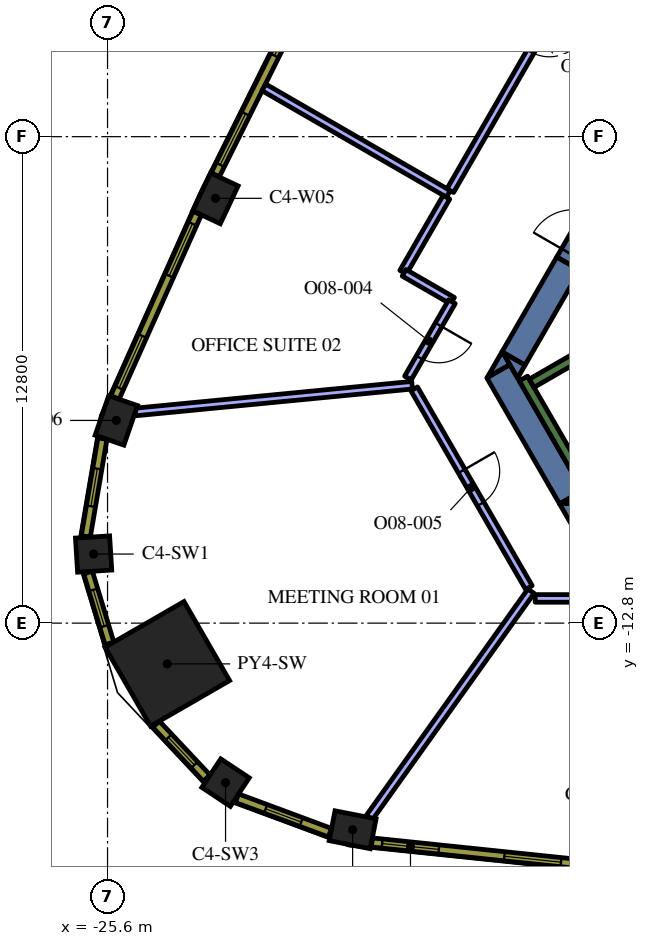
"""IFC4 building model, lengths in metres.
Left out: names, types, materials, properties, quantities, classifications, styles, units other than length and angle.
Written with IfcOpenShell. Run it as: python <this file> out.ifc"""

import sys

from ifc_helpers import new_model, si_unit, direction, frame, frame_2d, origin, origin_2d, place, context, subcontext, project, spatial, polyline, rectangle, outline, extrude, element, fill, save


model = new_model("IFC4")
c1 = context("Model", 3, precision=1e-05, world=origin(), true_north=direction((0.0, 1.0)))
c2 = subcontext(c1, "Body", "Model", "MODEL_VIEW")
j1 = project(units=[si_unit("LENGTHUNIT", "METRE"), si_unit("PLANEANGLEUNIT", "RADIAN")], contexts=[c1])
p1 = place(None, origin())
s1 = spatial("IfcSite", under=j1, at=p1, CompositionType="ELEMENT")
p2 = place(p1, origin())
s2 = spatial("IfcBuilding", under=s1, at=p2, CompositionType="ELEMENT")
p3 = place(p2, frame((0.0, 0.0, 231.0)))
s3 = spatial("IfcBuildingStorey", under=s2, at=p3, CompositionType="ELEMENT", Elevation=231.0)
p4 = place(p3, frame((-24.027, -13.872, 0.0), z_axis=(0.0, 0.0, 1.0), x_axis=(-0.866025403784, -0.5, 0.0)))
e1 = element("IfcColumn", 1, at=p4, inside=s3, PredefinedType="COLUMN", context=c2, shape_type="SweptSolid", body=[
    extrude(rectangle(XDim=2.4, YDim=2.4, at=origin_2d()), origin(), (0.0, 0.0, 1.0), 4.2),
])
for number, where, z_axis, x_axis in (
    (2, (-19.15, -18.237, 0.0), (0.0, 0.0, 1.0), (0.981, -0.192, 0.0)),
    (3, (-22.76, -1.623, 0.0), (0.0, 0.0, 1.0), (-0.426, -0.905, 0.0)),
    (4, (-25.369, -7.466, 0.0), (0.0, 0.0, 1.0), (-0.324, -0.946, 0.0)),
):
    element("IfcColumn", number, at=place(p3, frame(where, z_axis=z_axis, x_axis=x_axis)), inside=s3, PredefinedType="COLUMN", context=c2, shape_type="SweptSolid", body=[
        extrude(rectangle(XDim=1.1, YDim=0.8, at=origin_2d()), origin(), (0.0, 0.0, 1.0), 4.2),
    ])
for number, where, z_axis, x_axis in (
    (5, (-25.967, -10.982, 0.0), (0.0, 0.0, 1.0), (0.062, -0.998, 0.0)),
    (6, (-22.494, -16.997, 0.0), (0.0, 0.0, 1.0), (0.833, -0.553, 0.0)),
):
    element("IfcColumn", number, at=place(p3, frame(where, z_axis=z_axis, x_axis=x_axis)), inside=s3, PredefinedType="COLUMN", context=c2, shape_type="SweptSolid", body=[
        extrude(rectangle(XDim=0.9, YDim=0.9, at=origin_2d()), origin(), (0.0, 0.0, 1.0), 4.2),
    ])
p5 = place(p3, origin())
e7 = element("IfcWall", 7, at=p5, inside=s3, PredefinedType="SOLIDWALL", context=c2, shape_type="SweptSolid", body=[
    extrude(outline(polyline([(-13.712, -9.65), (-13.324, -9.65), (-13.324, -10.322), (-13.712, -9.65)])), origin(), (0.0, 0.0, 1.0), 4.2),
])
p6 = place(p3, frame((-13.402, -9.487, 0.0), z_axis=(0.0, 0.0, 1.0), x_axis=(-0.500020498207, 0.866013568815, 0.0)))
e8 = element("IfcWall", 8, at=p6, inside=s3, PredefinedType="SOLIDWALL", context=c2, shape_type="SweptSolid", body=[
    extrude(rectangle(XDim=3.829, YDim=0.7, at=frame_2d((1.915, 0.0))), origin(), (0.0, 0.0, 1.0), 4.2),
])
e9 = element("IfcWall", 9, at=p5, inside=s3, PredefinedType="SOLIDWALL", context=c2, shape_type="SweptSolid", body=[
    extrude(outline(polyline([(-15.014, -5.995), (-15.611, -6.339), (-15.213, -5.65), (-15.014, -5.995)])), origin(), (0.0, 0.0, 1.0), 4.2),
])
e10 = element("IfcWall", 10, at=p5, inside=s3, PredefinedType="SOLIDWALL", context=c2, shape_type="SweptSolid", body=[
    extrude(outline(polyline([(-12.904, -9.65), (-13.68, -9.65), (-13.098, -9.314), (-12.904, -9.65)])), origin(), (0.0, 0.0, 1.0), 4.2),
])
p7 = place(p3, frame((-13.475, -3.339, 0.0), z_axis=(0.0, 0.0, 1.0), x_axis=(-0.499944726303, -0.866057313716, 0.0)))
e11 = element("IfcWall", 11, at=p7, inside=s3, PredefinedType="SOLIDWALL", context=c2, shape_type="SweptSolid", body=[
    extrude(rectangle(XDim=2.884, YDim=0.7, at=frame_2d((1.442, 0.0))), origin(), (0.0, 0.0, 1.0), 4.2),
])
e12 = element("IfcWall", 12, at=p5, inside=s3, PredefinedType="SOLIDWALL", context=c2, shape_type="SweptSolid", body=[
    extrude(outline(polyline([(-14.809, -6.35), (-15.197, -5.678), (-14.615, -6.014), (-14.809, -6.35)])), origin(), (0.0, 0.0, 1.0), 4.2),
])
p8 = place(p3, frame((-12.84, -9.511, 0.0), z_axis=(0.0, 0.0, 1.0), x_axis=(-0.499997733992, 0.866026712061, 0.0)))
e13 = element("IfcWall", 13, at=p8, inside=s3, PredefinedType="SOLIDWALL", context=c2, shape_type="SweptSolid", body=[
    extrude(rectangle(XDim=3.634, YDim=0.25, at=frame_2d((1.817, 0.0))), origin(), (0.0, 0.0, 1.0), 4.2),
])
p9 = place(p3, frame((-14.44, -6.49, 0.0), z_axis=(0.0, 0.0, 1.0), x_axis=(0.866022966069, 0.500004222222, 0.0)))
e14 = element("IfcWall", 14, at=p9, inside=s3, PredefinedType="SOLIDWALL", context=c2, shape_type="SweptSolid", body=[
    extrude(rectangle(XDim=6.8, YDim=0.25, at=frame_2d((3.4, 0.0))), origin(), (0.0, 0.0, 1.0), 4.2),
])
p10 = place(p3, frame((-13.475, -3.339, 0.0), z_axis=(0.0, 0.0, 1.0), x_axis=(0.499954529098, 0.86605165483, 0.0)))
e15 = element("IfcWall", 15, at=p10, inside=s3, PredefinedType="SOLIDWALL", context=c2, shape_type="SweptSolid", body=[
    extrude(rectangle(XDim=1.7, YDim=0.7, at=frame_2d((0.85, 0.0))), origin(), (0.0, 0.0, 1.0), 4.2),
])
p11 = place(p10, frame((0.25, 0.0, 0.0)))
e16 = element("IfcOpeningElement", 16, at=p11, cuts=e15, PredefinedType="OPENING", context=c2, shape_type="SweptSolid", body=[
    extrude(rectangle(XDim=1.2, YDim=2.1, at=frame_2d((0.6, 1.05))), frame((0.0, 0.36, 0.0), z_axis=(0.0, -1.0, 0.0), x_axis=(1.0, 0.0, 0.0)), (0.0, 0.0, 1.0), 0.72),
])
p12 = place(p3, frame((-16.631, -1.506, 0.0), z_axis=(0.0, 0.0, 1.0), x_axis=(-0.866045655253, 0.499964921787, 0.0)))
e17 = element("IfcWall", 17, at=p12, inside=s3, PredefinedType="PARTITIONING", context=c2, shape_type="SweptSolid", body=[
    extrude(rectangle(XDim=5.607, YDim=0.2, at=frame_2d((2.804, 0.0))), origin(), (0.0, 0.0, 1.0), 3.45),
])
p13 = place(p3, frame((-11.871, 6.738, 0.0), z_axis=(0.0, 0.0, 1.0), x_axis=(-0.500019350398, -0.866014231539, 0.0)))
e18 = element("IfcWall", 18, at=p13, inside=s3, PredefinedType="PARTITIONING", context=c2, shape_type="SweptSolid", body=[
    extrude(rectangle(XDim=9.42, YDim=0.2, at=frame_2d((4.71, 0.0))), origin(), (0.0, 0.0, 1.0), 3.45),
])
p14 = place(p13, frame((4.2, 0.0, 0.0)))
e19 = element("IfcOpeningElement", 19, at=p14, cuts=e18, PredefinedType="OPENING", context=c2, shape_type="SweptSolid", body=[
    extrude(rectangle(XDim=1.0, YDim=2.1, at=frame_2d((0.5, 1.05))), frame((0.0, 0.11, 0.0), z_axis=(0.0, -1.0, 0.0), x_axis=(1.0, 0.0, 0.0)), (0.0, 0.0, 1.0), 0.22),
])
p15 = place(p3, frame((-17.586, -6.54, 0.0), z_axis=(0.0, 0.0, 1.0), x_axis=(-0.995357542522, -0.096246363795, 0.0)))
e20 = element("IfcWall", 20, at=p15, inside=s3, PredefinedType="PARTITIONING", context=c2, shape_type="SweptSolid", body=[
    extrude(rectangle(XDim=7.318, YDim=0.2, at=frame_2d((3.659, 0.0))), origin(), (0.0, 0.0, 1.0), 3.45),
])
p16 = place(p3, frame((-16.681, -1.593, 0.0), z_axis=(0.0, 0.0, 1.0), x_axis=(-0.499985038317, -0.866034041744, 0.0)))
e21 = element("IfcWall", 21, at=p16, inside=s3, PredefinedType="PARTITIONING", context=c2, shape_type="SweptSolid", body=[
    extrude(rectangle(XDim=2.28, YDim=0.2, at=frame_2d((1.14, 0.0))), origin(), (0.0, 0.0, 1.0), 3.45),
])
p17 = place(p3, frame((-17.795, -3.582, 0.0), z_axis=(0.0, 0.0, 1.0), x_axis=(0.866016893711, -0.50001473959, 0.0)))
e22 = element("IfcWall", 22, at=p17, inside=s3, PredefinedType="PARTITIONING", context=c2, shape_type="SweptSolid", body=[
    extrude(rectangle(XDim=1.47, YDim=0.2, at=frame_2d((0.735, 0.0))), origin(), (0.0, 0.0, 1.0), 3.45),
])
p18 = place(p3, frame((-16.537, -4.343, 0.0), z_axis=(0.0, 0.0, 1.0), x_axis=(-0.500014285048, -0.866017156151, 0.0)))
e23 = element("IfcWall", 23, at=p18, inside=s3, PredefinedType="PARTITIONING", context=c2, shape_type="SweptSolid", body=[
    extrude(rectangle(XDim=2.317, YDim=0.2, at=frame_2d((1.159, 0.0))), origin(), (0.0, 0.0, 1.0), 3.45),
])
p19 = place(p18, frame((0.7, 0.0, 0.0)))
e24 = element("IfcOpeningElement", 24, at=p19, cuts=e23, PredefinedType="OPENING", context=c2, shape_type="SweptSolid", body=[
    extrude(rectangle(XDim=1.0, YDim=2.1, at=frame_2d((0.5, 1.05))), frame((0.0, 0.11, 0.0), z_axis=(0.0, -1.0, 0.0), x_axis=(1.0, 0.0, 0.0)), (0.0, 0.0, 1.0), 0.22),
])
p20 = place(p3, frame((-14.457, -11.96, 0.0), z_axis=(0.0, 0.0, 1.0), x_axis=(-0.581023578026, -0.813886725397, 0.0)))
e25 = element("IfcWall", 25, at=p20, inside=s3, PredefinedType="PARTITIONING", context=c2, shape_type="SweptSolid", body=[
    extrude(rectangle(XDim=7.318, YDim=0.2, at=frame_2d((3.659, 0.0))), origin(), (0.0, 0.0, 1.0), 3.45),
])
p21 = place(p3, frame((-17.531, -6.635, 0.0), z_axis=(0.0, 0.0, 1.0), x_axis=(0.500009459589, -0.866019942219, 0.0)))
e26 = element("IfcWall", 26, at=p21, inside=s3, PredefinedType="PARTITIONING", context=c2, shape_type="SweptSolid", body=[
    extrude(rectangle(XDim=6.038, YDim=0.2, at=frame_2d((3.019, 0.0))), origin(), (0.0, 0.0, 1.0), 3.45),
])
p22 = place(p21, frame((2.5, 0.0, 0.0)))
e27 = element("IfcOpeningElement", 27, at=p22, cuts=e26, PredefinedType="OPENING", context=c2, shape_type="SweptSolid", body=[
    extrude(rectangle(XDim=1.0, YDim=2.1, at=frame_2d((0.5, 1.05))), frame((0.0, 0.11, 0.0), z_axis=(0.0, -1.0, 0.0), x_axis=(1.0, 0.0, 0.0)), (0.0, 0.0, 1.0), 0.22),
])
p23 = place(p3, frame((-14.347, -12.15, 0.0), z_axis=(0.0, 0.0, 1.0), x_axis=(1.0, 0.0, 0.0)))
e28 = element("IfcWall", 28, at=p23, inside=s3, PredefinedType="PARTITIONING", context=c2, shape_type="SweptSolid", body=[
    extrude(rectangle(XDim=9.817, YDim=0.2, at=frame_2d((4.909, 0.0))), origin(), (0.0, 0.0, 1.0), 3.45),
])
p24 = place(p23, frame((4.4, 0.0, 0.0)))
e29 = element("IfcOpeningElement", 29, at=p24, cuts=e28, PredefinedType="OPENING", context=c2, shape_type="SweptSolid", body=[
    extrude(rectangle(XDim=1.0, YDim=2.1, at=frame_2d((0.5, 1.05))), frame((0.0, 0.11, 0.0), z_axis=(0.0, -1.0, 0.0), x_axis=(1.0, 0.0, 0.0)), (0.0, 0.0, 1.0), 0.22),
])
p25 = place(p3, frame((-18.644, -18.571, 0.0), z_axis=(0.0, 0.0, 1.0), x_axis=(0.994621961215, -0.103571976272, 0.0)))
e30 = element("IfcWall", 30, at=p25, inside=s3, PredefinedType="SOLIDWALL", context=c2, shape_type="SweptSolid", body=[
    extrude(rectangle(XDim=5.311, YDim=0.24, at=frame_2d((2.655, 0.0))), origin(), (0.0, 0.0, 1.0), 3.95),
])
p26 = place(p25, frame((0.271, 0.0, 0.9)))
e31 = element("IfcOpeningElement", 31, at=p26, cuts=e30, PredefinedType="OPENING", context=c2, shape_type="SweptSolid", body=[
    extrude(rectangle(XDim=1.5, YDim=2.55, at=frame_2d((0.75, 1.275))), frame((0.0, 0.13, 0.0), z_axis=(0.0, -1.0, 0.0), x_axis=(1.0, 0.0, 0.0)), (0.0, 0.0, 1.0), 0.26),
])
p27 = place(p25, frame((3.504, 0.0, 0.9)))
e32 = element("IfcOpeningElement", 32, at=p27, cuts=e30, PredefinedType="OPENING", context=c2, shape_type="SweptSolid", body=[
    extrude(rectangle(XDim=1.5, YDim=2.55, at=frame_2d((0.75, 1.275))), frame((0.0, 0.13, 0.0), z_axis=(0.0, -1.0, 0.0), x_axis=(1.0, 0.0, 0.0)), (0.0, 0.0, 1.0), 0.26),
])
p28 = place(p3, frame((-20.407, 3.74, 0.0), z_axis=(0.0, 0.0, 1.0), x_axis=(-0.445129582031, -0.895466166419, 0.0)))
e33 = element("IfcWall", 33, at=p28, inside=s3, PredefinedType="SOLIDWALL", context=c2, shape_type="SweptSolid", body=[
    extrude(rectangle(XDim=5.298, YDim=0.24, at=frame_2d((2.649, 0.0))), origin(), (0.0, 0.0, 1.0), 3.95),
])
p29 = place(p28, frame((0.295, 0.0, 0.9)))
e34 = element("IfcOpeningElement", 34, at=p29, cuts=e33, PredefinedType="OPENING", context=c2, shape_type="SweptSolid", body=[
    extrude(rectangle(XDim=1.5, YDim=2.55, at=frame_2d((0.75, 1.275))), frame((0.0, 0.13, 0.0), z_axis=(0.0, -1.0, 0.0), x_axis=(1.0, 0.0, 0.0)), (0.0, 0.0, 1.0), 0.26),
])
p30 = place(p28, frame((3.504, 0.0, 0.9)))
e35 = element("IfcOpeningElement", 35, at=p30, cuts=e33, PredefinedType="OPENING", context=c2, shape_type="SweptSolid", body=[
    extrude(rectangle(XDim=1.5, YDim=2.55, at=frame_2d((0.75, 1.275))), frame((0.0, 0.13, 0.0), z_axis=(0.0, -1.0, 0.0), x_axis=(1.0, 0.0, 0.0)), (0.0, 0.0, 1.0), 0.26),
])
p31 = place(p3, frame((-23.24, -2.011, 0.0), z_axis=(0.0, 0.0, 1.0), x_axis=(-0.407579651789, -0.913169659728, 0.0)))
e36 = element("IfcWall", 36, at=p31, inside=s3, PredefinedType="SOLIDWALL", context=c2, shape_type="SweptSolid", body=[
    extrude(rectangle(XDim=5.311, YDim=0.24, at=frame_2d((2.655, 0.0))), origin(), (0.0, 0.0, 1.0), 3.95),
])
p32 = place(p31, frame((0.306, 0.0, 0.9)))
e37 = element("IfcOpeningElement", 37, at=p32, cuts=e36, PredefinedType="OPENING", context=c2, shape_type="SweptSolid", body=[
    extrude(rectangle(XDim=1.5, YDim=2.55, at=frame_2d((0.75, 1.275))), frame((0.0, 0.13, 0.0), z_axis=(0.0, -1.0, 0.0), x_axis=(1.0, 0.0, 0.0)), (0.0, 0.0, 1.0), 0.26),
])
p33 = place(p31, frame((3.539, 0.0, 0.9)))
e38 = element("IfcOpeningElement", 38, at=p33, cuts=e36, PredefinedType="OPENING", context=c2, shape_type="SweptSolid", body=[
    extrude(rectangle(XDim=1.5, YDim=2.55, at=frame_2d((0.75, 1.275))), frame((0.0, 0.13, 0.0), z_axis=(0.0, -1.0, 0.0), x_axis=(1.0, 0.0, 0.0)), (0.0, 0.0, 1.0), 0.26),
])
p34 = place(p3, frame((-25.734, -7.945, 0.0), z_axis=(0.0, 0.0, 1.0), x_axis=(-0.167660055546, -0.985844869021, 0.0)))
e39 = element("IfcWall", 39, at=p34, inside=s3, PredefinedType="SOLIDWALL", context=c2, shape_type="SweptSolid", body=[
    extrude(rectangle(XDim=2.609, YDim=0.24, at=frame_2d((1.305, 0.0))), origin(), (0.0, 0.0, 1.0), 3.95),
])
p35 = place(p34, frame((0.805, 0.0, 0.9)))
e40 = element("IfcOpeningElement", 40, at=p35, cuts=e39, PredefinedType="OPENING", context=c2, shape_type="SweptSolid", body=[
    extrude(rectangle(XDim=1.0, YDim=2.55, at=frame_2d((0.5, 1.275))), frame((0.0, 0.13, 0.0), z_axis=(0.0, -1.0, 0.0), x_axis=(1.0, 0.0, 0.0)), (0.0, 0.0, 1.0), 0.26),
])
p36 = place(p3, frame((-26.112, -11.469, 0.0), z_axis=(0.0, 0.0, 1.0), x_axis=(0.288727209095, -0.957411405159, 0.0)))
e41 = element("IfcWall", 41, at=p36, inside=s3, PredefinedType="SOLIDWALL", context=c2, shape_type="SweptSolid", body=[
    extrude(rectangle(XDim=1.948, YDim=0.24, at=frame_2d((0.974, 0.0))), origin(), (0.0, 0.0, 1.0), 3.95),
])
p37 = place(p36, frame((0.474, 0.0, 0.9)))
e42 = element("IfcOpeningElement", 42, at=p37, cuts=e41, PredefinedType="OPENING", context=c2, shape_type="SweptSolid", body=[
    extrude(rectangle(XDim=1.0, YDim=2.55, at=frame_2d((0.5, 1.275))), frame((0.0, 0.13, 0.0), z_axis=(0.0, -1.0, 0.0), x_axis=(1.0, 0.0, 0.0)), (0.0, 0.0, 1.0), 0.26),
])
p38 = place(p3, frame((-24.323, -15.459, 0.0), z_axis=(0.0, 0.0, 1.0), x_axis=(0.684770274166, -0.728758994194, 0.0)))
e43 = element("IfcWall", 43, at=p38, inside=s3, PredefinedType="SOLIDWALL", context=c2, shape_type="SweptSolid", body=[
    extrude(rectangle(XDim=1.948, YDim=0.24, at=frame_2d((0.974, 0.0))), origin(), (0.0, 0.0, 1.0), 3.95),
])
p39 = place(p38, frame((0.474, 0.0, 0.9)))
e44 = element("IfcOpeningElement", 44, at=p39, cuts=e43, PredefinedType="OPENING", context=c2, shape_type="SweptSolid", body=[
    extrude(rectangle(XDim=1.0, YDim=2.55, at=frame_2d((0.5, 1.275))), frame((0.0, 0.13, 0.0), z_axis=(0.0, -1.0, 0.0), x_axis=(1.0, 0.0, 0.0)), (0.0, 0.0, 1.0), 0.26),
])
p40 = place(p3, frame((-22.194, -17.406, 0.0), z_axis=(0.0, 0.0, 1.0), x_axis=(0.937569171184, -0.347798863203, 0.0)))
e45 = element("IfcWall", 45, at=p40, inside=s3, PredefinedType="SOLIDWALL", context=c2, shape_type="SweptSolid", body=[
    extrude(rectangle(XDim=2.609, YDim=0.24, at=frame_2d((1.305, 0.0))), origin(), (0.0, 0.0, 1.0), 3.95),
])
p41 = place(p40, frame((0.805, 0.0, 0.9)))
e46 = element("IfcOpeningElement", 46, at=p41, cuts=e45, PredefinedType="OPENING", context=c2, shape_type="SweptSolid", body=[
    extrude(rectangle(XDim=1.0, YDim=2.55, at=frame_2d((0.5, 1.275))), frame((0.0, 0.13, 0.0), z_axis=(0.0, -1.0, 0.0), x_axis=(1.0, 0.0, 0.0)), (0.0, 0.0, 1.0), 0.26),
])
p42 = place(p19, origin())
e47 = element("IfcDoor", 47, at=p42, inside=s3, OperationType="SINGLE_SWING_RIGHT", PredefinedType="DOOR", context=c2, shape_type="SweptSolid", body=[
    extrude(rectangle(XDim=1.0, YDim=2.1, at=frame_2d((0.5, 1.05))), frame((0.0, 0.025, 0.0), z_axis=(0.0, -1.0, 0.0), x_axis=(1.0, 0.0, 0.0)), (0.0, 0.0, 1.0), 0.05),
])
fill(e24, e47)
p43 = place(p22, origin())
e48 = element("IfcDoor", 48, at=p43, inside=s3, OperationType="SINGLE_SWING_LEFT", PredefinedType="DOOR", context=c2, shape_type="SweptSolid", body=[
    extrude(rectangle(XDim=1.0, YDim=2.1, at=frame_2d((0.5, 1.05))), frame((0.0, 0.025, 0.0), z_axis=(0.0, -1.0, 0.0), x_axis=(1.0, 0.0, 0.0)), (0.0, 0.0, 1.0), 0.05),
])
fill(e27, e48)
p44 = place(p26, origin())
e49 = element("IfcWindow", 49, at=p44, inside=s3, PartitioningType="SINGLE_PANEL", PredefinedType="WINDOW", context=c2, shape_type="SweptSolid", body=[
    extrude(rectangle(XDim=1.5, YDim=2.55, at=frame_2d((0.75, 1.275))), frame((0.0, 0.04, 0.0), z_axis=(0.0, -1.0, 0.0), x_axis=(1.0, 0.0, 0.0)), (0.0, 0.0, 1.0), 0.06),
])
fill(e31, e49)
p45 = place(p27, origin())
e50 = element("IfcWindow", 50, at=p45, inside=s3, PartitioningType="SINGLE_PANEL", PredefinedType="WINDOW", context=c2, shape_type="SweptSolid", body=[
    extrude(rectangle(XDim=1.5, YDim=2.55, at=frame_2d((0.75, 1.275))), frame((0.0, 0.04, 0.0), z_axis=(0.0, -1.0, 0.0), x_axis=(1.0, 0.0, 0.0)), (0.0, 0.0, 1.0), 0.06),
])
fill(e32, e50)
p46 = place(p29, origin())
e51 = element("IfcWindow", 51, at=p46, inside=s3, PartitioningType="SINGLE_PANEL", PredefinedType="WINDOW", context=c2, shape_type="SweptSolid", body=[
    extrude(rectangle(XDim=1.5, YDim=2.55, at=frame_2d((0.75, 1.275))), frame((0.0, 0.04, 0.0), z_axis=(0.0, -1.0, 0.0), x_axis=(1.0, 0.0, 0.0)), (0.0, 0.0, 1.0), 0.06),
])
fill(e34, e51)
p47 = place(p30, origin())
e52 = element("IfcWindow", 52, at=p47, inside=s3, PartitioningType="SINGLE_PANEL", PredefinedType="WINDOW", context=c2, shape_type="SweptSolid", body=[
    extrude(rectangle(XDim=1.5, YDim=2.55, at=frame_2d((0.75, 1.275))), frame((0.0, 0.04, 0.0), z_axis=(0.0, -1.0, 0.0), x_axis=(1.0, 0.0, 0.0)), (0.0, 0.0, 1.0), 0.06),
])
fill(e35, e52)
p48 = place(p32, origin())
e53 = element("IfcWindow", 53, at=p48, inside=s3, PartitioningType="SINGLE_PANEL", PredefinedType="WINDOW", context=c2, shape_type="SweptSolid", body=[
    extrude(rectangle(XDim=1.5, YDim=2.55, at=frame_2d((0.75, 1.275))), frame((0.0, 0.04, 0.0), z_axis=(0.0, -1.0, 0.0), x_axis=(1.0, 0.0, 0.0)), (0.0, 0.0, 1.0), 0.06),
])
fill(e37, e53)
p49 = place(p33, origin())
e54 = element("IfcWindow", 54, at=p49, inside=s3, PartitioningType="SINGLE_PANEL", PredefinedType="WINDOW", context=c2, shape_type="SweptSolid", body=[
    extrude(rectangle(XDim=1.5, YDim=2.55, at=frame_2d((0.75, 1.275))), frame((0.0, 0.04, 0.0), z_axis=(0.0, -1.0, 0.0), x_axis=(1.0, 0.0, 0.0)), (0.0, 0.0, 1.0), 0.06),
])
fill(e38, e54)
p50 = place(p35, origin())
e55 = element("IfcWindow", 55, at=p50, inside=s3, PartitioningType="SINGLE_PANEL", PredefinedType="WINDOW", context=c2, shape_type="SweptSolid", body=[
    extrude(rectangle(XDim=1.0, YDim=2.55, at=frame_2d((0.5, 1.275))), frame((0.0, 0.04, 0.0), z_axis=(0.0, -1.0, 0.0), x_axis=(1.0, 0.0, 0.0)), (0.0, 0.0, 1.0), 0.06),
])
fill(e40, e55)
p51 = place(p37, origin())
e56 = element("IfcWindow", 56, at=p51, inside=s3, PartitioningType="SINGLE_PANEL", PredefinedType="WINDOW", context=c2, shape_type="SweptSolid", body=[
    extrude(rectangle(XDim=1.0, YDim=2.55, at=frame_2d((0.5, 1.275))), frame((0.0, 0.04, 0.0), z_axis=(0.0, -1.0, 0.0), x_axis=(1.0, 0.0, 0.0)), (0.0, 0.0, 1.0), 0.06),
])
fill(e42, e56)
p52 = place(p39, origin())
e57 = element("IfcWindow", 57, at=p52, inside=s3, PartitioningType="SINGLE_PANEL", PredefinedType="WINDOW", context=c2, shape_type="SweptSolid", body=[
    extrude(rectangle(XDim=1.0, YDim=2.55, at=frame_2d((0.5, 1.275))), frame((0.0, 0.04, 0.0), z_axis=(0.0, -1.0, 0.0), x_axis=(1.0, 0.0, 0.0)), (0.0, 0.0, 1.0), 0.06),
])
fill(e44, e57)
p53 = place(p41, origin())
e58 = element("IfcWindow", 58, at=p53, inside=s3, PartitioningType="SINGLE_PANEL", PredefinedType="WINDOW", context=c2, shape_type="SweptSolid", body=[
    extrude(rectangle(XDim=1.0, YDim=2.55, at=frame_2d((0.5, 1.275))), frame((0.0, 0.04, 0.0), z_axis=(0.0, -1.0, 0.0), x_axis=(1.0, 0.0, 0.0)), (0.0, 0.0, 1.0), 0.06),
])
fill(e46, e58)
save(model, sys.argv[1])
